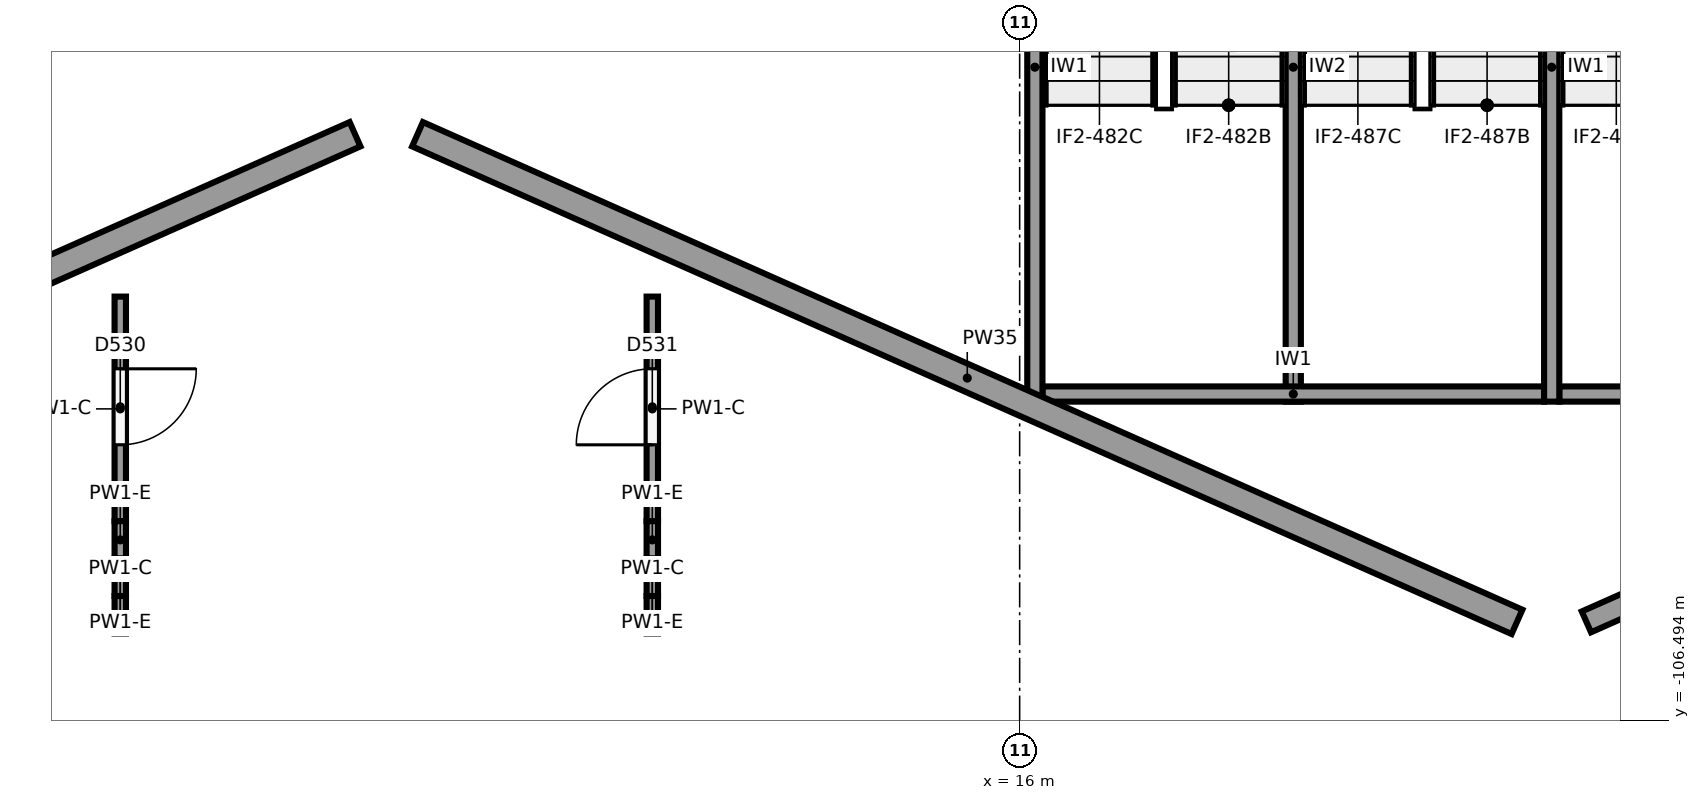
"""IFC4 building model, lengths in metres.
Left out: names, types, materials, properties, quantities, classifications, styles, units other than length and angle.
Written with IfcOpenShell. Run it as: python <this file> out.ifc"""

import sys

from ifc_helpers import new_model, si_unit, direction, frame, frame_2d, origin, origin_2d, place, context, subcontext, project, spatial, rectangle, circle, extrude, element, fill, save


model = new_model("IFC4")
c1 = context("Model", 3, precision=1e-05, world=origin(), true_north=direction((0.0, 1.0)))
c2 = subcontext(c1, "Body", "Model", "MODEL_VIEW")
j1 = project(units=[si_unit("LENGTHUNIT", "METRE"), si_unit("PLANEANGLEUNIT", "RADIAN")], contexts=[c1])
p1 = place(None, origin())
s1 = spatial("IfcSite", under=j1, at=p1, CompositionType="ELEMENT")
p2 = place(p1, origin())
s2 = spatial("IfcBuilding", under=s1, at=p2, CompositionType="ELEMENT")
p3 = place(p2, origin())
s3 = spatial("IfcBuildingStorey", under=s2, at=p3, CompositionType="ELEMENT", Elevation=0.0)
p4 = place(p3, frame((7.667, -98.6, 0.0), z_axis=(0.0, 0.0, 1.0), x_axis=(1.0, 0.0, 0.0)))
e1 = element("IfcColumn", 1, at=p4, inside=s3, PredefinedType="COLUMN", context=c2, shape_type="SweptSolid", body=[
    extrude(circle(Radius=0.45, at=origin_2d()), origin(), (0.0, 0.0, 1.0), 6.5),
])
p5 = place(p3, frame((23.0, -105.4, 0.0), z_axis=(0.0, 0.0, 1.0), x_axis=(1.0, 0.0, 0.0)))
e2 = element("IfcColumn", 2, at=p5, inside=s3, PredefinedType="COLUMN", context=c2, shape_type="SweptSolid", body=[
    extrude(circle(Radius=0.5, at=origin_2d()), origin(), (0.0, 0.0, 1.0), 6.5),
])
for number, where, z_axis, x_axis in (
    (3, (7.667, -104.2, -0.3), (0.0, 0.0, 1.0), (1.0, 0.0, 0.0)),
    (4, (16.85, -104.2, -0.3), (0.0, 0.0, 1.0), (1.0, 0.0, 0.0)),
):
    element("IfcColumn", number, at=place(p3, frame(where, z_axis=z_axis, x_axis=x_axis)), inside=s3, PredefinedType="COLUMN", context=c2, shape_type="SweptSolid", body=[
        extrude(circle(Radius=0.3, at=origin_2d()), origin(), (0.0, 0.0, 1.0), 6.8),
    ])
p6 = place(p3, frame((7.256, -98.782, 0.0), z_axis=(0.0, 0.0, 1.0), x_axis=(-0.914136361455, -0.405406848322, 0.0)))
e5 = element("IfcWall", 5, at=p6, inside=s3, PredefinedType="SOLIDWALL", context=c2, shape_type="SweptSolid", body=[
    extrude(rectangle(XDim=15.824, YDim=0.35, at=frame_2d((7.912, 0.0))), origin(), (0.0, 0.0, 1.0), 4.85),
])
p7 = place(p3, frame((22.543, -105.198, 0.0), z_axis=(0.0, 0.0, 1.0), x_axis=(-0.914138897099, 0.405401130748, 0.0)))
e6 = element("IfcWall", 6, at=p7, inside=s3, PredefinedType="SOLIDWALL", context=c2, shape_type="SweptSolid", body=[
    extrude(rectangle(XDim=15.824, YDim=0.35, at=frame_2d((7.912, 0.0))), origin(), (0.0, 0.0, 1.0), 4.85),
])
p8 = place(p3, frame((37.922, -98.782, 0.0), z_axis=(0.0, 0.0, 1.0), x_axis=(-0.914138897099, -0.405401130748, 0.0)))
e7 = element("IfcWall", 7, at=p8, inside=s3, PredefinedType="SOLIDWALL", context=c2, shape_type="SweptSolid", body=[
    extrude(rectangle(XDim=15.824, YDim=0.3, at=frame_2d((7.912, 0.0))), origin(), (0.0, 0.0, 1.0), 4.85),
])
for number, where, z_axis, x_axis in (
    (8, (16.2, -102.3, 0.0), (0.0, 0.0, 1.0), (0.0, 1.0, 0.0)),
    (9, (23.0, -102.3, 0.0), (0.0, 0.0, 1.0), (0.0, 1.0, 0.0)),
):
    element("IfcWall", number, at=place(p3, frame(where, z_axis=z_axis, x_axis=x_axis)), inside=s3, PredefinedType="SHEAR", context=c2, shape_type="SweptSolid", body=[
        extrude(rectangle(XDim=8.8, YDim=0.2, at=frame_2d((4.4, 0.0))), origin(), (0.0, 0.0, 1.0), 6.15),
    ])
for number, where, z_axis, x_axis in (
    (10, (16.3, -102.2, 0.0), (0.0, 0.0, 1.0), (1.0, 0.0, 0.0)),
    (11, (23.1, -102.2, 0.0), (0.0, 0.0, 1.0), (1.0, 0.0, 0.0)),
):
    element("IfcWall", number, at=place(p3, frame(where, z_axis=z_axis, x_axis=x_axis)), inside=s3, PredefinedType="SHEAR", context=c2, shape_type="SweptSolid", body=[
        extrude(rectangle(XDim=6.6, YDim=0.2, at=frame_2d((3.3, 0.0))), origin(), (0.0, 0.0, 1.0), 6.15),
    ])
p9 = place(p3, frame((19.6, -102.3, 0.0), z_axis=(0.0, 0.0, 1.0), x_axis=(0.0, 1.0, 0.0)))
e12 = element("IfcWall", 12, at=p9, inside=s3, PredefinedType="SHEAR", context=c2, shape_type="SweptSolid", body=[
    extrude(rectangle(XDim=8.8, YDim=0.2, at=frame_2d((4.4, 0.0))), origin(), (0.0, 0.0, 1.0), 6.15),
])
p10 = place(p3, frame((4.167, -100.918, 0.0), z_axis=(0.0, 0.0, 1.0), x_axis=(0.0, -1.0, 0.0)))
e13 = element("IfcWall", 13, at=p10, inside=s3, PredefinedType="PARTITIONING", context=c2, shape_type="SweptSolid", body=[
    extrude(rectangle(XDim=2.955, YDim=0.15, at=frame_2d((1.477, 0.0))), origin(), (0.0, 0.0, 1.0), 6.05),
])
p11 = place(p10, frame((0.95, 0.0, 0.0)))
e14 = element("IfcOpeningElement", 14, at=p11, cuts=e13, PredefinedType="OPENING", context=c2, shape_type="SweptSolid", body=[
    extrude(rectangle(XDim=1.0, YDim=2.1, at=frame_2d((0.5, 1.05))), frame((0.0, 0.085, 0.0), z_axis=(0.0, -1.0, 0.0), x_axis=(1.0, 0.0, 0.0)), (0.0, 0.0, 1.0), 0.17),
])
p12 = place(p3, frame((4.167, -103.873, 0.0), z_axis=(0.0, 0.0, 1.0), x_axis=(0.0, -1.0, 0.0)))
e15 = element("IfcWall", 15, at=p12, inside=s3, PredefinedType="PARTITIONING", context=c2, shape_type="SweptSolid", body=[
    extrude(rectangle(XDim=0.492, YDim=0.15, at=frame_2d((0.246, 0.0))), origin(), (0.0, 0.0, 1.0), 5.25),
])
p13 = place(p3, frame((4.167, -104.365, 0.0), z_axis=(0.0, 0.0, 1.0), x_axis=(0.0, -1.0, 0.0)))
e16 = element("IfcWall", 16, at=p13, inside=s3, PredefinedType="PARTITIONING", context=c2, shape_type="SweptSolid", body=[
    extrude(rectangle(XDim=0.493, YDim=0.15, at=frame_2d((0.246, 0.0))), origin(), (0.0, 0.0, 1.0), 5.25),
])
p14 = place(p3, frame((4.167, -104.858, 0.0), z_axis=(0.0, 0.0, 1.0), x_axis=(0.0, -1.0, 0.0)))
e17 = element("IfcWall", 17, at=p14, inside=s3, PredefinedType="PARTITIONING", context=c2, shape_type="SweptSolid", body=[
    extrude(rectangle(XDim=0.492, YDim=0.15, at=frame_2d((0.246, 0.0))), origin(), (0.0, 0.0, 1.0), 6.05),
])
p15 = place(p3, frame((11.167, -103.873, 0.0), z_axis=(0.0, 0.0, 1.0), x_axis=(0.0, 1.0, 0.0)))
e18 = element("IfcWall", 18, at=p15, inside=s3, PredefinedType="PARTITIONING", context=c2, shape_type="SweptSolid", body=[
    extrude(rectangle(XDim=2.955, YDim=0.15, at=frame_2d((1.477, 0.0))), origin(), (0.0, 0.0, 1.0), 6.05),
])
p16 = place(p15, frame((1.005, 0.0, 0.0)))
e19 = element("IfcOpeningElement", 19, at=p16, cuts=e18, PredefinedType="OPENING", context=c2, shape_type="SweptSolid", body=[
    extrude(rectangle(XDim=1.0, YDim=2.1, at=frame_2d((0.5, 1.05))), frame((0.0, 0.085, 0.0), z_axis=(0.0, -1.0, 0.0), x_axis=(1.0, 0.0, 0.0)), (0.0, 0.0, 1.0), 0.17),
])
p17 = place(p3, frame((11.167, -103.873, 0.0), z_axis=(0.0, 0.0, 1.0), x_axis=(0.0, -1.0, 0.0)))
e20 = element("IfcWall", 20, at=p17, inside=s3, PredefinedType="PARTITIONING", context=c2, shape_type="SweptSolid", body=[
    extrude(rectangle(XDim=0.492, YDim=0.15, at=frame_2d((0.246, 0.0))), origin(), (0.0, 0.0, 1.0), 5.25),
])
p18 = place(p3, frame((11.167, -104.365, 0.0), z_axis=(0.0, 0.0, 1.0), x_axis=(0.0, -1.0, 0.0)))
e21 = element("IfcWall", 21, at=p18, inside=s3, PredefinedType="PARTITIONING", context=c2, shape_type="SweptSolid", body=[
    extrude(rectangle(XDim=0.493, YDim=0.15, at=frame_2d((0.246, 0.0))), origin(), (0.0, 0.0, 1.0), 5.25),
])
p19 = place(p3, frame((11.167, -104.858, 0.0), z_axis=(0.0, 0.0, 1.0), x_axis=(0.0, -1.0, 0.0)))
e22 = element("IfcWall", 22, at=p19, inside=s3, PredefinedType="PARTITIONING", context=c2, shape_type="SweptSolid", body=[
    extrude(rectangle(XDim=0.492, YDim=0.15, at=frame_2d((0.246, 0.0))), origin(), (0.0, 0.0, 1.0), 6.05),
])
p20 = place(p11, origin())
e23 = element("IfcDoor", 23, at=p20, inside=s3, OperationType="SINGLE_SWING_LEFT", PredefinedType="DOOR", context=c2, shape_type="SweptSolid", body=[
    extrude(rectangle(XDim=1.0, YDim=2.1, at=frame_2d((0.5, 1.05))), frame((0.0, 0.025, 0.0), z_axis=(0.0, -1.0, 0.0), x_axis=(1.0, 0.0, 0.0)), (0.0, 0.0, 1.0), 0.05),
])
fill(e14, e23)
p21 = place(p16, origin())
e24 = element("IfcDoor", 24, at=p21, inside=s3, OperationType="SINGLE_SWING_LEFT", PredefinedType="DOOR", context=c2, shape_type="SweptSolid", body=[
    extrude(rectangle(XDim=1.0, YDim=2.1, at=frame_2d((0.5, 1.05))), frame((0.0, 0.025, 0.0), z_axis=(0.0, -1.0, 0.0), x_axis=(1.0, 0.0, 0.0)), (0.0, 0.0, 1.0), 0.05),
])
fill(e19, e24)
save(model, sys.argv[1])
